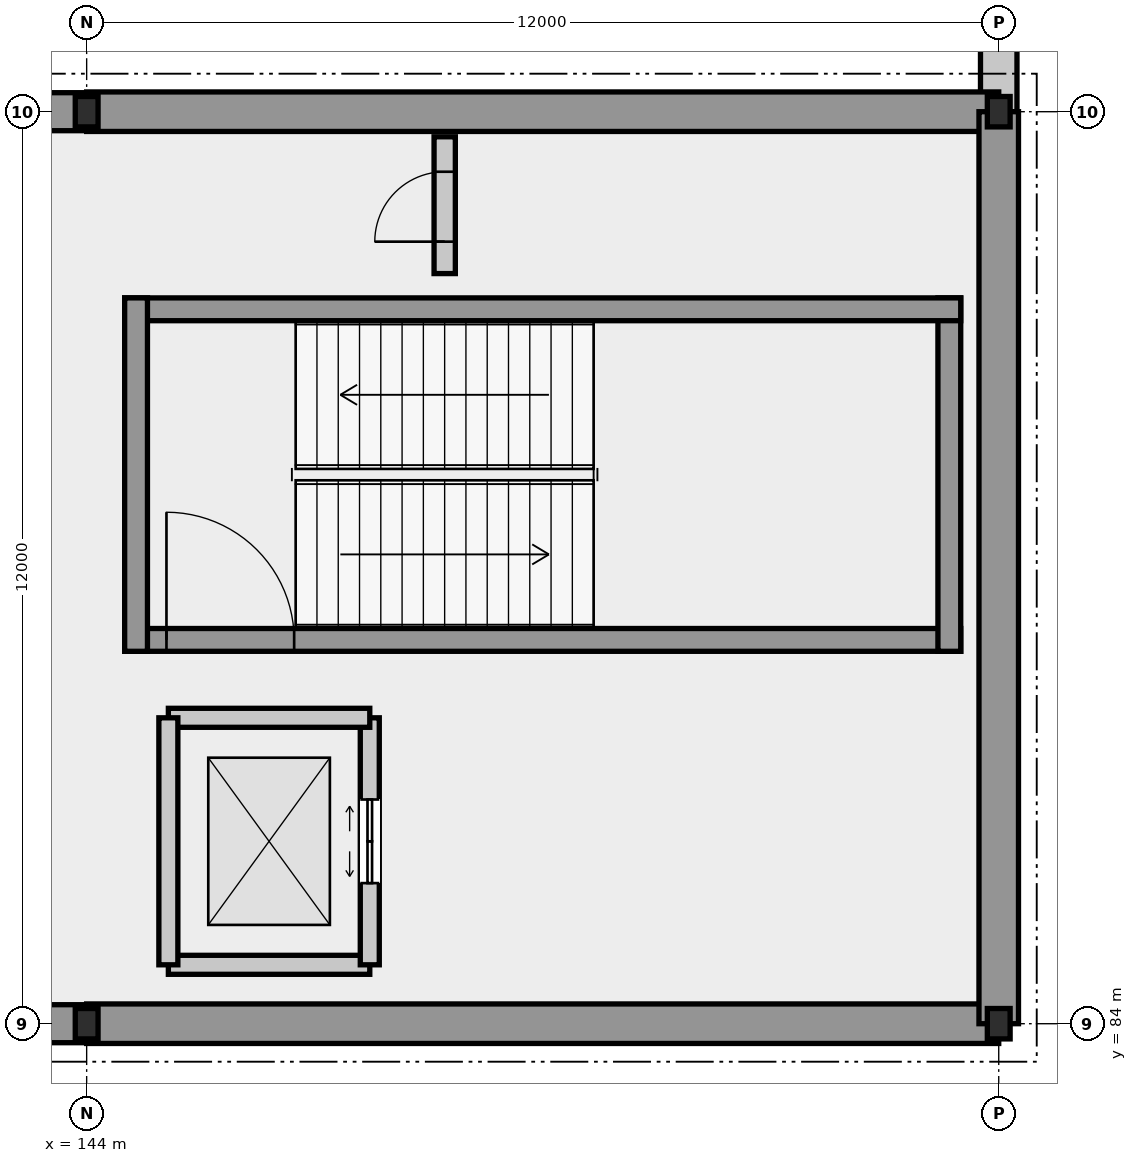
"""IFC4 building model, lengths in metres.
Left out: names, types, materials, properties, quantities, classifications, styles, units other than length and angle.
Written with IfcOpenShell. Run it as: python <this file> out.ifc"""

import sys

from ifc_helpers import new_model, si_unit, direction, frame, frame_2d, origin, origin_2d, place, context, subcontext, project, spatial, rectangle, i_section, extrude, element, fill, save


model = new_model("IFC4")
c1 = context("Model", 3, precision=1e-05, world=origin(), true_north=direction((0.0, 1.0)))
c2 = subcontext(c1, "Body", "Model", "MODEL_VIEW")
j1 = project(units=[si_unit("LENGTHUNIT", "METRE"), si_unit("PLANEANGLEUNIT", "RADIAN")], contexts=[c1])
p1 = place(None, origin())
s1 = spatial("IfcSite", under=j1, at=p1, CompositionType="ELEMENT")
p2 = place(p1, origin())
s2 = spatial("IfcBuilding", under=s1, at=p2, CompositionType="ELEMENT")
p3 = place(p2, frame((0.0, 0.0, -5.4)))
s3 = spatial("IfcBuildingStorey", under=s2, at=p3, CompositionType="ELEMENT", Elevation=-5.4)
for number, where, z_axis, x_axis in (
    (1, (144.0, 84.0, 0.0), (0.0, 0.0, 1.0), (1.0, 0.0, 0.0)),
    (2, (144.0, 96.0, 0.0), (0.0, 0.0, 1.0), (1.0, 0.0, 0.0)),
    (3, (156.0, 84.0, 0.0), (0.0, 0.0, 1.0), (1.0, 0.0, 0.0)),
    (4, (156.0, 96.0, 0.0), (0.0, 0.0, 1.0), (1.0, 0.0, 0.0)),
):
    element("IfcColumn", number, at=place(p3, frame(where, z_axis=z_axis, x_axis=x_axis)), inside=s3, PredefinedType="COLUMN", context=c2, shape_type="SweptSolid", body=[
        extrude(i_section(OverallWidth=0.3, OverallDepth=0.4, WebThickness=0.013, FlangeThickness=0.024, FilletRadius=0.027, at=origin_2d()), origin(), (0.0, 0.0, 1.0), 5.4),
    ])
p4 = place(p3, frame((156.0, 96.0, -0.4), z_axis=(0.0, 0.0, 1.0), x_axis=(0.0, 1.0, 0.0)))
e5 = element("IfcWall", 5, at=p4, inside=s3, PredefinedType="SOLIDWALL", context=c2, shape_type="SweptSolid", body=[
    extrude(rectangle(XDim=11.76, YDim=0.48, at=frame_2d((5.88, 0.0))), origin(), (0.0, 0.0, 1.0), 4.98),
])
for number, where, z_axis, x_axis in (
    (6, (132.0, 84.0, 0.0), (0.0, 0.0, 1.0), (1.0, 0.0, 0.0)),
    (7, (144.0, 96.0, 0.0), (0.0, 0.0, 1.0), (-1.0, 0.0, 0.0)),
):
    element("IfcWall", number, at=place(p3, frame(where, z_axis=z_axis, x_axis=x_axis)), inside=s3, PredefinedType="USERDEFINED", context=c2, shape_type="SweptSolid", body=[
        extrude(rectangle(XDim=12.0, YDim=0.5, at=frame_2d((6.0, 0.0))), origin(), (0.0, 0.0, 1.0), 4.54),
    ])
for number, where, z_axis, x_axis in (
    (8, (144.0, 84.0, 0.0), (0.0, 0.0, 1.0), (1.0, 0.0, 0.0)),
    (9, (156.0, 96.0, 0.0), (0.0, 0.0, 1.0), (-1.0, 0.0, 0.0)),
    (10, (156.0, 84.0, 0.0), (0.0, 0.0, 1.0), (0.0, 1.0, 0.0)),
):
    element("IfcWall", number, at=place(p3, frame(where, z_axis=z_axis, x_axis=x_axis)), inside=s3, PredefinedType="USERDEFINED", context=c2, shape_type="SweptSolid", body=[
        extrude(rectangle(XDim=12.0, YDim=0.52, at=frame_2d((6.0, 0.0))), origin(), (0.0, 0.0, 1.0), 4.54),
    ])
p5 = place(p3, frame((144.5, 89.05, 0.0), z_axis=(0.0, 0.0, 1.0), x_axis=(1.0, 0.0, 0.0)))
e11 = element("IfcWall", 11, at=p5, inside=s3, PredefinedType="SHEAR", context=c2, shape_type="SweptSolid", body=[
    extrude(rectangle(XDim=11.0, YDim=0.3, at=frame_2d((5.5, 0.0))), origin(), (0.0, 0.0, 1.0), 5.12),
])
p6 = place(p5, frame((0.55, 0.0, 0.0)))
e12 = element("IfcOpeningElement", 12, at=p6, cuts=e11, PredefinedType="OPENING", context=c2, shape_type="SweptSolid", body=[
    extrude(rectangle(XDim=1.68, YDim=2.35, at=frame_2d((0.84, 1.175))), frame((0.0, 0.16, 0.0), z_axis=(0.0, -1.0, 0.0), x_axis=(1.0, 0.0, 0.0)), (0.0, 0.0, 1.0), 0.32),
])
p7 = place(p3, frame((155.35, 88.9, 0.0), z_axis=(0.0, 0.0, 1.0), x_axis=(0.0, 1.0, 0.0)))
e13 = element("IfcWall", 13, at=p7, inside=s3, PredefinedType="SHEAR", context=c2, shape_type="SweptSolid", body=[
    extrude(rectangle(XDim=4.65, YDim=0.3, at=frame_2d((2.325, 0.0))), origin(), (0.0, 0.0, 1.0), 5.12),
])
p8 = place(p3, frame((155.5, 93.4, 0.0), z_axis=(0.0, 0.0, 1.0), x_axis=(-1.0, 0.0, 0.0)))
e14 = element("IfcWall", 14, at=p8, inside=s3, PredefinedType="SHEAR", context=c2, shape_type="SweptSolid", body=[
    extrude(rectangle(XDim=11.0, YDim=0.3, at=frame_2d((5.5, 0.0))), origin(), (0.0, 0.0, 1.0), 5.12),
])
p9 = place(p3, frame((144.65, 93.55, 0.0), z_axis=(0.0, 0.0, 1.0), x_axis=(0.0, -1.0, 0.0)))
e15 = element("IfcWall", 15, at=p9, inside=s3, PredefinedType="SHEAR", context=c2, shape_type="SweptSolid", body=[
    extrude(rectangle(XDim=4.65, YDim=0.3, at=frame_2d((2.325, 0.0))), origin(), (0.0, 0.0, 1.0), 5.12),
])
p10 = place(p3, frame((145.075, 84.775, 0.0), z_axis=(0.0, 0.0, 1.0), x_axis=(1.0, 0.0, 0.0)))
e16 = element("IfcWall", 16, at=p10, inside=s3, PredefinedType="SOLIDWALL", context=c2, shape_type="SweptSolid", body=[
    extrude(rectangle(XDim=2.65, YDim=0.25, at=frame_2d((1.325, 0.0))), origin(), (0.0, 0.0, 1.0), 5.12),
])
p11 = place(p3, frame((147.725, 84.775, 0.0), z_axis=(0.0, 0.0, 1.0), x_axis=(0.0, 1.0, 0.0)))
e17 = element("IfcWall", 17, at=p11, inside=s3, PredefinedType="SOLIDWALL", context=c2, shape_type="SweptSolid", body=[
    extrude(rectangle(XDim=3.25, YDim=0.25, at=frame_2d((1.625, 0.0))), origin(), (0.0, 0.0, 1.0), 5.12),
])
p12 = place(p11, frame((1.075, 0.0, 0.0)))
e18 = element("IfcOpeningElement", 18, at=p12, cuts=e17, PredefinedType="OPENING", context=c2, shape_type="SweptSolid", body=[
    extrude(rectangle(XDim=1.1, YDim=2.2, at=frame_2d((0.55, 1.1))), frame((0.0, 0.135, 0.0), z_axis=(0.0, -1.0, 0.0), x_axis=(1.0, 0.0, 0.0)), (0.0, 0.0, 1.0), 0.27),
])
p13 = place(p3, frame((147.725, 88.025, 0.0), z_axis=(0.0, 0.0, 1.0), x_axis=(-1.0, 0.0, 0.0)))
e19 = element("IfcWall", 19, at=p13, inside=s3, PredefinedType="SOLIDWALL", context=c2, shape_type="SweptSolid", body=[
    extrude(rectangle(XDim=2.65, YDim=0.25, at=frame_2d((1.325, 0.0))), origin(), (0.0, 0.0, 1.0), 5.12),
])
p14 = place(p3, frame((145.075, 88.025, 0.0), z_axis=(0.0, 0.0, 1.0), x_axis=(0.0, -1.0, 0.0)))
e20 = element("IfcWall", 20, at=p14, inside=s3, PredefinedType="SOLIDWALL", context=c2, shape_type="SweptSolid", body=[
    extrude(rectangle(XDim=3.25, YDim=0.25, at=frame_2d((1.625, 0.0))), origin(), (0.0, 0.0, 1.0), 5.12),
])
p15 = place(p3, frame((148.711, 93.87, 0.0), z_axis=(0.0, 0.0, 1.0), x_axis=(0.0, 1.0, 0.0)))
e21 = element("IfcWall", 21, at=p15, inside=s3, PredefinedType="SOLIDWALL", context=c2, shape_type="SweptSolid", body=[
    extrude(rectangle(XDim=1.8, YDim=0.28, at=frame_2d((0.9, 0.0))), origin(), (0.0, 0.0, 1.0), 5.1),
])
p16 = place(p15, frame((0.42, 0.0, 0.0)))
e22 = element("IfcOpeningElement", 22, at=p16, cuts=e21, PredefinedType="OPENING", context=c2, shape_type="SweptSolid", body=[
    extrude(rectangle(XDim=0.92, YDim=2.15, at=frame_2d((0.46, 1.075))), frame((0.0, 0.15, 0.0), z_axis=(0.0, -1.0, 0.0), x_axis=(1.0, 0.0, 0.0)), (0.0, 0.0, 1.0), 0.3),
])
p17 = place(p6, origin())
e23 = element("IfcDoor", 23, at=p17, inside=s3, OperationType="DOUBLE_DOOR_SINGLE_SWING", PredefinedType="DOOR", context=c2, shape_type="SweptSolid", body=[
    extrude(rectangle(XDim=1.68, YDim=2.35, at=frame_2d((0.84, 1.175))), frame((0.0, 0.025, 0.0), z_axis=(0.0, -1.0, 0.0), x_axis=(1.0, 0.0, 0.0)), (0.0, 0.0, 1.0), 0.05),
])
fill(e12, e23)
p18 = place(p12, origin())
e24 = element("IfcDoor", 24, at=p18, inside=s3, OperationType="SLIDING_TO_LEFT", PredefinedType="DOOR", context=c2, shape_type="SweptSolid", body=[
    extrude(rectangle(XDim=1.1, YDim=2.2, at=frame_2d((0.55, 1.1))), frame((0.0, 0.025, 0.0), z_axis=(0.0, -1.0, 0.0), x_axis=(1.0, 0.0, 0.0)), (0.0, 0.0, 1.0), 0.05),
])
fill(e18, e24)
p19 = place(p16, origin())
e25 = element("IfcDoor", 25, at=p19, inside=s3, OperationType="SINGLE_SWING_LEFT", PredefinedType="DOOR", context=c2, shape_type="SweptSolid", body=[
    extrude(rectangle(XDim=0.92, YDim=2.15, at=frame_2d((0.46, 1.075))), frame((0.0, 0.025, 0.0), z_axis=(0.0, -1.0, 0.0), x_axis=(1.0, 0.0, 0.0)), (0.0, 0.0, 1.0), 0.05),
])
fill(e22, e25)
save(model, sys.argv[1])
